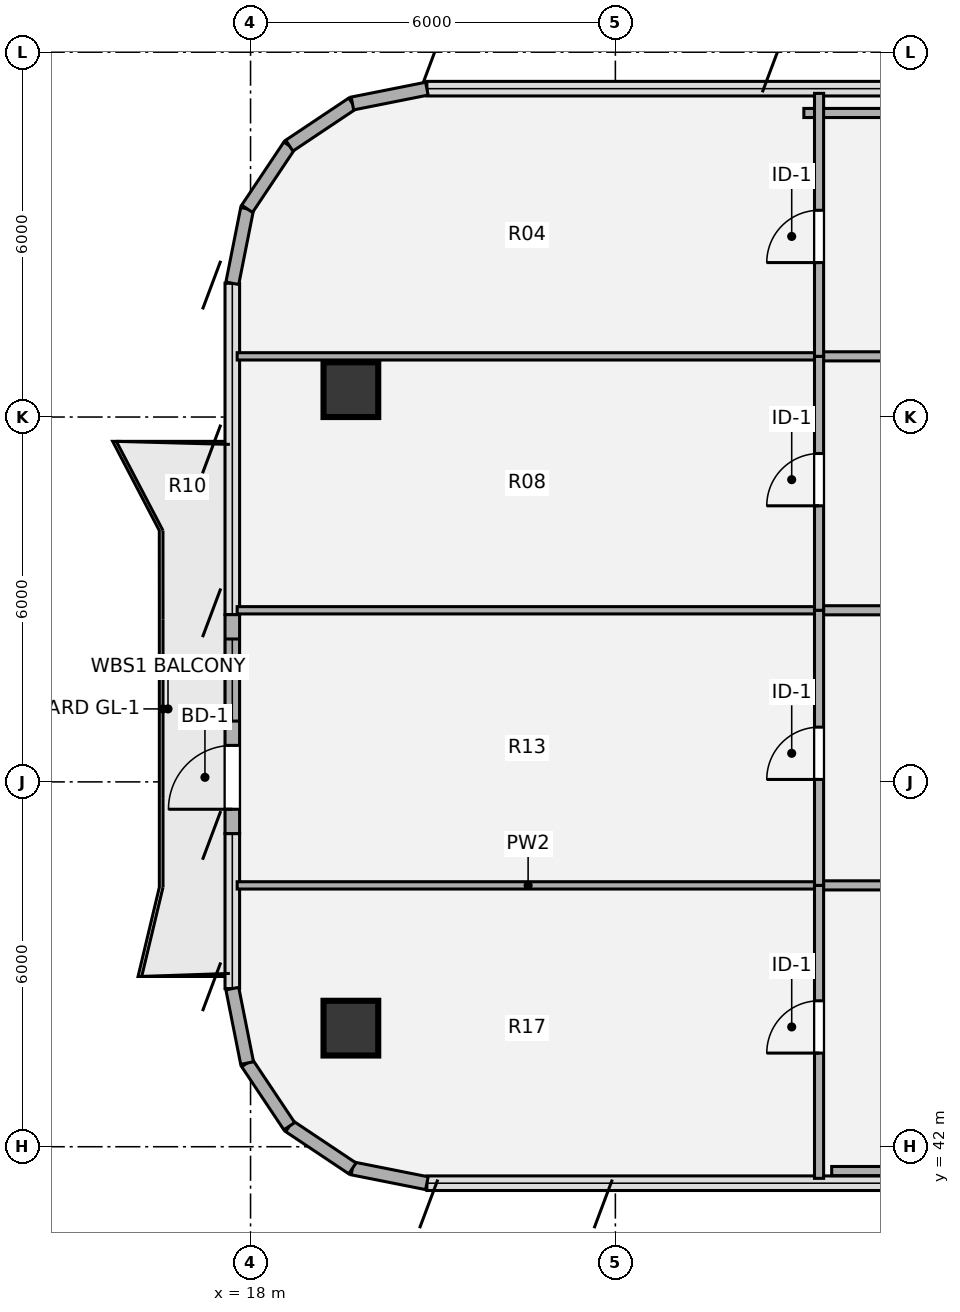
"""IFC4 building model, lengths in metres.
Left out: names, types, materials, properties, quantities, classifications, styles, units other than length and angle.
Written with IfcOpenShell. Run it as: python <this file> out.ifc"""

import sys

from ifc_helpers import new_model, si_unit, direction, frame, frame_2d, origin, origin_2d, place, context, subcontext, project, spatial, rectangle, hollow_circle, extrude, source, transform, mapped, element, fill, save


model = new_model("IFC4")
c1 = context("Model", 3, precision=1e-05, world=origin(), true_north=direction((0.0, 1.0)))
c2 = subcontext(c1, "Body", "Model", "MODEL_VIEW")
j1 = project(units=[si_unit("LENGTHUNIT", "METRE"), si_unit("PLANEANGLEUNIT", "RADIAN")], contexts=[c1])
p1 = place(None, origin())
s1 = spatial("IfcSite", under=j1, at=p1, CompositionType="ELEMENT")
p2 = place(p1, origin())
s2 = spatial("IfcBuilding", under=s1, at=p2, CompositionType="ELEMENT")
p3 = place(p2, frame((0.0, 0.0, 268.38)))
s3 = spatial("IfcBuildingStorey", under=s2, at=p3, CompositionType="ELEMENT", Elevation=268.38)
m1 = source(origin(), c2, "Body", "SweptSolid", [
    extrude(hollow_circle(Radius=0.45, WallThickness=0.032, at=origin_2d()), origin(), (0.0, 0.0, 1.0), 3.78),
])
for number, where, z_axis, x_axis in (
    (1, (19.65, 43.95, 0.0), (0.0, 0.0, 1.0), (1.0, 0.0, 0.0)),
    (2, (19.65, 54.45, 0.0), (0.0, 0.0, 1.0), (1.0, 0.0, 0.0)),
):
    element("IfcColumn", number, at=place(p3, frame(where, z_axis=z_axis, x_axis=x_axis)), inside=s3, PredefinedType="COLUMN", context=c2, shape_type="MappedRepresentation", body=[
        mapped(m1, transform((0.0, 0.0, 0.0), x_axis=(1.0, 0.0, 0.0), y_axis=(0.0, 1.0, 0.0), z_axis=(0.0, 0.0, 1.0), scale=1.0)),
    ])
for number, where, z_axis, x_axis in (
    (3, (20.9, 41.4, 0.0), (0.0, 0.0, 1.0), (-0.981, 0.195, 0.0)),
    (4, (19.675, 41.644, 0.0), (0.0, 0.0, 1.0), (-0.831, 0.556, 0.0)),
    (5, (18.637, 42.337, 0.0), (0.0, 0.0, 1.0), (-0.556, 0.831, 0.0)),
    (6, (17.944, 43.375, 0.0), (0.0, 0.0, 1.0), (-0.195, 0.981, 0.0)),
):
    element("IfcWall", number, at=place(p3, frame(where, z_axis=z_axis, x_axis=x_axis)), inside=s3, PredefinedType="SOLIDWALL", context=c2, shape_type="SweptSolid", body=[
        extrude(rectangle(XDim=1.249, YDim=0.215, at=frame_2d((0.624, 0.0))), origin(), (0.0, 0.0, 1.0), 3.53),
    ])
p4 = place(p3, frame((17.7, 47.15, 0.0), z_axis=(0.0, 0.0, 1.0), x_axis=(0.0, 1.0, 0.0)))
e7 = element("IfcWall", 7, at=p4, inside=s3, PredefinedType="SOLIDWALL", context=c2, shape_type="SweptSolid", body=[
    extrude(rectangle(XDim=3.6, YDim=0.24, at=frame_2d((1.8, 0.0))), origin(), (0.0, 0.0, 1.0), 3.53),
])
p5 = place(p4, frame((0.4, 0.0, 0.0)))
e8 = element("IfcOpeningElement", 8, at=p5, cuts=e7, PredefinedType="OPENING", context=c2, shape_type="SweptSolid", body=[
    extrude(rectangle(XDim=1.05, YDim=2.15, at=origin_2d()), frame((0.525, 0.13, 1.075), z_axis=(0.0, -1.0, 0.0), x_axis=(1.0, 0.0, 0.0)), (0.0, 0.0, 1.0), 0.26),
])
p6 = place(p4, frame((1.85, 0.0, 0.85)))
e9 = element("IfcOpeningElement", 9, at=p6, cuts=e7, PredefinedType="OPENING", context=c2, shape_type="SweptSolid", body=[
    extrude(rectangle(XDim=1.35, YDim=1.35, at=origin_2d()), frame((0.675, 0.13, 0.675), z_axis=(0.0, -1.0, 0.0), x_axis=(1.0, 0.0, 0.0)), (0.0, 0.0, 1.0), 0.26),
])
for number, where, z_axis, x_axis in (
    (10, (17.7, 56.2, 0.0), (0.0, 0.0, 1.0), (0.195, 0.981, 0.0)),
    (11, (17.944, 57.425, 0.0), (0.0, 0.0, 1.0), (0.556, 0.831, 0.0)),
    (12, (18.637, 58.463, 0.0), (0.0, 0.0, 1.0), (0.831, 0.556, 0.0)),
    (13, (19.675, 59.156, 0.0), (0.0, 0.0, 1.0), (0.981, 0.195, 0.0)),
):
    element("IfcWall", number, at=place(p3, frame(where, z_axis=z_axis, x_axis=x_axis)), inside=s3, PredefinedType="SOLIDWALL", context=c2, shape_type="SweptSolid", body=[
        extrude(rectangle(XDim=1.249, YDim=0.215, at=frame_2d((0.624, 0.0))), origin(), (0.0, 0.0, 1.0), 3.53),
    ])
p7 = place(p3, frame((27.558, 41.6, 0.0), z_axis=(0.0, 0.0, 1.0), x_axis=(1.0, 0.0, 0.0)))
e14 = element("IfcWall", 14, at=p7, inside=s3, PredefinedType="PARTITIONING", context=c2, shape_type="SweptSolid", body=[
    extrude(rectangle(XDim=5.992, YDim=0.15, at=frame_2d((2.996, 0.0))), origin(), (0.0, 0.0, 1.0), 3.5),
])
p8 = place(p3, frame((17.78, 46.298, 0.0), z_axis=(0.0, 0.0, 1.0), x_axis=(1.0, 0.0, 0.0)))
e15 = element("IfcWall", 15, at=p8, inside=s3, PredefinedType="PARTITIONING", context=c2, shape_type="SweptSolid", body=[
    extrude(rectangle(XDim=9.57, YDim=0.12, at=frame_2d((4.785, 0.0))), origin(), (0.0, 0.0, 1.0), 3.055),
])
p9 = place(p3, frame((27.35, 46.298, 0.0), z_axis=(0.0, 0.0, 1.0), x_axis=(1.0, 0.0, 0.0)))
e16 = element("IfcWall", 16, at=p9, inside=s3, PredefinedType="PARTITIONING", context=c2, shape_type="SweptSolid", body=[
    extrude(rectangle(XDim=6.2, YDim=0.15, at=frame_2d((3.1, 0.0))), origin(), (0.0, 0.0, 1.0), 3.055),
])
p10 = place(p3, frame((17.78, 50.822, 0.0), z_axis=(0.0, 0.0, 1.0), x_axis=(1.0, 0.0, 0.0)))
e17 = element("IfcWall", 17, at=p10, inside=s3, PredefinedType="PARTITIONING", context=c2, shape_type="SweptSolid", body=[
    extrude(rectangle(XDim=9.57, YDim=0.12, at=frame_2d((4.785, 0.0))), origin(), (0.0, 0.0, 1.0), 2.982),
])
p11 = place(p3, frame((27.35, 50.822, 0.0), z_axis=(0.0, 0.0, 1.0), x_axis=(1.0, 0.0, 0.0)))
e18 = element("IfcWall", 18, at=p11, inside=s3, PredefinedType="PARTITIONING", context=c2, shape_type="SweptSolid", body=[
    extrude(rectangle(XDim=6.2, YDim=0.15, at=frame_2d((3.1, 0.0))), origin(), (0.0, 0.0, 1.0), 2.982),
])
p12 = place(p3, frame((17.78, 54.998, 0.0), z_axis=(0.0, 0.0, 1.0), x_axis=(1.0, 0.0, 0.0)))
e19 = element("IfcWall", 19, at=p12, inside=s3, PredefinedType="PARTITIONING", context=c2, shape_type="SweptSolid", body=[
    extrude(rectangle(XDim=9.57, YDim=0.12, at=frame_2d((4.785, 0.0))), origin(), (0.0, 0.0, 1.0), 3.5),
])
p13 = place(p3, frame((27.35, 54.998, 0.0), z_axis=(0.0, 0.0, 1.0), x_axis=(1.0, 0.0, 0.0)))
e20 = element("IfcWall", 20, at=p13, inside=s3, PredefinedType="PARTITIONING", context=c2, shape_type="SweptSolid", body=[
    extrude(rectangle(XDim=6.2, YDim=0.15, at=frame_2d((3.1, 0.0))), origin(), (0.0, 0.0, 1.0), 3.259),
])
p14 = place(p3, frame((27.1, 59.0, 0.0), z_axis=(0.0, 0.0, 1.0), x_axis=(1.0, 0.0, 0.0)))
e21 = element("IfcWall", 21, at=p14, inside=s3, PredefinedType="PARTITIONING", context=c2, shape_type="SweptSolid", body=[
    extrude(rectangle(XDim=17.8, YDim=0.15, at=frame_2d((8.9, 0.0))), origin(), (0.0, 0.0, 1.0), 3.308),
])
p15 = place(p14, frame((8.375, 0.0, 0.0)))
e22 = element("IfcOpeningElement", 22, at=p15, cuts=e21, PredefinedType="OPENING", context=c2, shape_type="SweptSolid", body=[
    extrude(rectangle(XDim=1.05, YDim=2.1, at=origin_2d()), frame((0.525, 0.085, 1.05), z_axis=(0.0, -1.0, 0.0), x_axis=(1.0, 0.0, 0.0)), (0.0, 0.0, 1.0), 0.17),
])
p16 = place(p3, frame((27.35, 41.48, 0.0), z_axis=(0.0, 0.0, 1.0), x_axis=(0.0, 1.0, 0.0)))
e23 = element("IfcWall", 23, at=p16, inside=s3, PredefinedType="PARTITIONING", context=c2, shape_type="SweptSolid", body=[
    extrude(rectangle(XDim=4.818, YDim=0.15, at=frame_2d((2.409, 0.0))), origin(), (0.0, 0.0, 1.0), 3.5),
])
p17 = place(p16, frame((2.06, 0.0, 0.0)))
e24 = element("IfcOpeningElement", 24, at=p17, cuts=e23, PredefinedType="OPENING", context=c2, shape_type="SweptSolid", body=[
    extrude(rectangle(XDim=0.86, YDim=2.1, at=origin_2d()), frame((0.43, 0.085, 1.05), z_axis=(0.0, -1.0, 0.0), x_axis=(1.0, 0.0, 0.0)), (0.0, 0.0, 1.0), 0.17),
])
p18 = place(p3, frame((27.35, 46.298, 0.0), z_axis=(0.0, 0.0, 1.0), x_axis=(0.0, 1.0, 0.0)))
e25 = element("IfcWall", 25, at=p18, inside=s3, PredefinedType="PARTITIONING", context=c2, shape_type="SweptSolid", body=[
    extrude(rectangle(XDim=4.524, YDim=0.15, at=frame_2d((2.262, 0.0))), origin(), (0.0, 0.0, 1.0), 3.5),
])
p19 = place(p18, frame((1.742, 0.0, 0.0)))
e26 = element("IfcOpeningElement", 26, at=p19, cuts=e25, PredefinedType="OPENING", context=c2, shape_type="SweptSolid", body=[
    extrude(rectangle(XDim=0.86, YDim=2.1, at=origin_2d()), frame((0.43, 0.085, 1.05), z_axis=(0.0, -1.0, 0.0), x_axis=(1.0, 0.0, 0.0)), (0.0, 0.0, 1.0), 0.17),
])
p20 = place(p3, frame((27.35, 50.822, 0.0), z_axis=(0.0, 0.0, 1.0), x_axis=(0.0, 1.0, 0.0)))
e27 = element("IfcWall", 27, at=p20, inside=s3, PredefinedType="PARTITIONING", context=c2, shape_type="SweptSolid", body=[
    extrude(rectangle(XDim=4.176, YDim=0.15, at=frame_2d((2.088, 0.0))), origin(), (0.0, 0.0, 1.0), 3.5),
])
p21 = place(p20, frame((1.718, 0.0, 0.0)))
e28 = element("IfcOpeningElement", 28, at=p21, cuts=e27, PredefinedType="OPENING", context=c2, shape_type="SweptSolid", body=[
    extrude(rectangle(XDim=0.86, YDim=2.1, at=origin_2d()), frame((0.43, 0.085, 1.05), z_axis=(0.0, -1.0, 0.0), x_axis=(1.0, 0.0, 0.0)), (0.0, 0.0, 1.0), 0.17),
])
p22 = place(p3, frame((27.35, 54.998, 0.0), z_axis=(0.0, 0.0, 1.0), x_axis=(0.0, 1.0, 0.0)))
e29 = element("IfcWall", 29, at=p22, inside=s3, PredefinedType="PARTITIONING", context=c2, shape_type="SweptSolid", body=[
    extrude(rectangle(XDim=4.324, YDim=0.15, at=frame_2d((2.162, 0.0))), origin(), (0.0, 0.0, 1.0), 3.5),
])
p23 = place(p22, frame((1.542, 0.0, 0.0)))
e30 = element("IfcOpeningElement", 30, at=p23, cuts=e29, PredefinedType="OPENING", context=c2, shape_type="SweptSolid", body=[
    extrude(rectangle(XDim=0.86, YDim=2.1, at=origin_2d()), frame((0.43, 0.085, 1.05), z_axis=(0.0, -1.0, 0.0), x_axis=(1.0, 0.0, 0.0)), (0.0, 0.0, 1.0), 0.17),
])
m2 = source(origin(), c2, "Body", "SweptSolid", [
    extrude(rectangle(XDim=1.05, YDim=2.15, at=origin_2d()), frame((0.525, 0.025, 1.075), z_axis=(0.0, -1.0, 0.0), x_axis=(1.0, 0.0, 0.0)), (0.0, 0.0, 1.0), 0.05),
])
p24 = place(p5, origin())
e31 = element("IfcDoor", 31, at=p24, inside=s3, OperationType="SINGLE_SWING_LEFT", PredefinedType="DOOR", context=c2, shape_type="MappedRepresentation", body=[
    mapped(m2, transform((0.0, 0.0, 0.0), x_axis=(1.0, 0.0, 0.0), y_axis=(0.0, 1.0, 0.0), z_axis=(0.0, 0.0, 1.0), scale=1.0)),
])
fill(e8, e31)
m3 = source(origin(), c2, "Body", "SweptSolid", [
    extrude(rectangle(XDim=1.35, YDim=1.35, at=origin_2d()), frame((0.675, 0.03, 0.675), z_axis=(0.0, -1.0, 0.0), x_axis=(1.0, 0.0, 0.0)), (0.0, 0.0, 1.0), 0.06),
])
p25 = place(p6, origin())
e32 = element("IfcWindow", 32, at=p25, inside=s3, PartitioningType="SINGLE_PANEL", PredefinedType="WINDOW", context=c2, shape_type="MappedRepresentation", body=[
    mapped(m3, transform((0.0, 0.0, 0.0), x_axis=(1.0, 0.0, 0.0), y_axis=(0.0, 1.0, 0.0), z_axis=(0.0, 0.0, 1.0), scale=1.0)),
])
fill(e9, e32)
m4 = source(origin(), c2, "Body", "SweptSolid", [
    extrude(rectangle(XDim=0.86, YDim=2.1, at=origin_2d()), frame((0.43, 0.025, 1.05), z_axis=(0.0, -1.0, 0.0), x_axis=(1.0, 0.0, 0.0)), (0.0, 0.0, 1.0), 0.05),
])
p26 = place(p17, origin())
e33 = element("IfcDoor", 33, at=p26, inside=s3, OperationType="SINGLE_SWING_LEFT", PredefinedType="DOOR", context=c2, shape_type="MappedRepresentation", body=[
    mapped(m4, transform((0.0, 0.0, 0.0), x_axis=(1.0, 0.0, 0.0), y_axis=(0.0, 1.0, 0.0), z_axis=(0.0, 0.0, 1.0), scale=1.0)),
])
fill(e24, e33)
p27 = place(p19, origin())
e34 = element("IfcDoor", 34, at=p27, inside=s3, OperationType="SINGLE_SWING_LEFT", PredefinedType="DOOR", context=c2, shape_type="MappedRepresentation", body=[
    mapped(m4, transform((0.0, 0.0, 0.0), x_axis=(1.0, 0.0, 0.0), y_axis=(0.0, 1.0, 0.0), z_axis=(0.0, 0.0, 1.0), scale=1.0)),
])
fill(e26, e34)
p28 = place(p21, origin())
e35 = element("IfcDoor", 35, at=p28, inside=s3, OperationType="SINGLE_SWING_LEFT", PredefinedType="DOOR", context=c2, shape_type="MappedRepresentation", body=[
    mapped(m4, transform((0.0, 0.0, 0.0), x_axis=(1.0, 0.0, 0.0), y_axis=(0.0, 1.0, 0.0), z_axis=(0.0, 0.0, 1.0), scale=1.0)),
])
fill(e28, e35)
p29 = place(p23, origin())
e36 = element("IfcDoor", 36, at=p29, inside=s3, OperationType="SINGLE_SWING_LEFT", PredefinedType="DOOR", context=c2, shape_type="MappedRepresentation", body=[
    mapped(m4, transform((0.0, 0.0, 0.0), x_axis=(1.0, 0.0, 0.0), y_axis=(0.0, 1.0, 0.0), z_axis=(0.0, 0.0, 1.0), scale=1.0)),
])
fill(e30, e36)
save(model, sys.argv[1])
